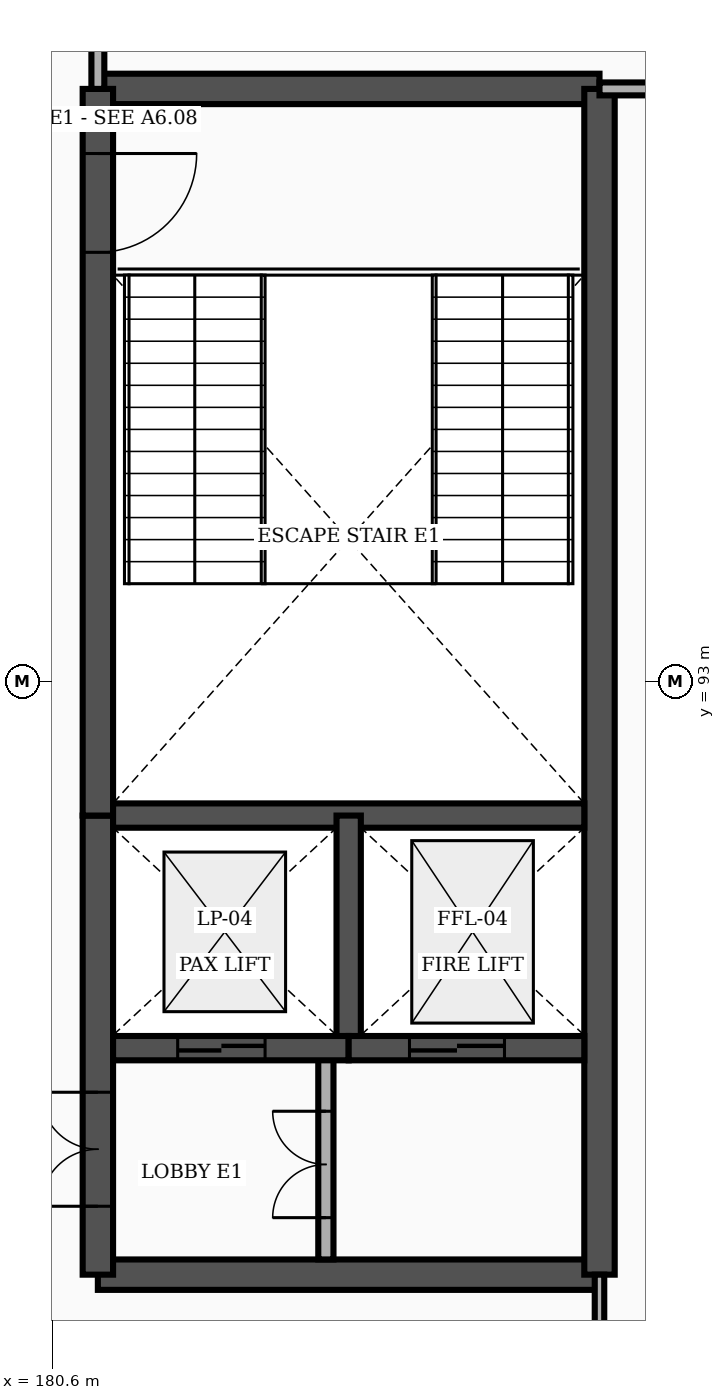
"""IFC4 building model, lengths in metres.
Left out: names, types, materials, properties, quantities, classifications, styles, units other than length and angle.
Written with IfcOpenShell. Run it as: python <this file> out.ifc"""

import sys

from ifc_helpers import new_model, si_unit, direction, frame, frame_2d, origin, place, context, subcontext, project, spatial, rectangle, extrude, element, fill, save


model = new_model("IFC4")
c1 = context("Model", 3, precision=1e-05, world=origin(), true_north=direction((0.0, 1.0)))
c2 = subcontext(c1, "Body", "Model", "MODEL_VIEW")
j1 = project(units=[si_unit("LENGTHUNIT", "METRE"), si_unit("PLANEANGLEUNIT", "RADIAN")], contexts=[c1])
p1 = place(None, origin())
s1 = spatial("IfcSite", under=j1, at=p1, CompositionType="ELEMENT")
p2 = place(p1, origin())
s2 = spatial("IfcBuilding", under=s1, at=p2, CompositionType="ELEMENT")
p3 = place(p2, frame((0.0, 0.0, 16.8)))
s3 = spatial("IfcBuildingStorey", under=s2, at=p3, CompositionType="ELEMENT", Elevation=16.8)
for number, where, z_axis, x_axis in (
    (1, (181.2, 85.2, 0.0), (0.0, 0.0, 1.0), (1.0, 0.0, 0.0)),
    (2, (181.2, 100.8, 0.0), (0.0, 0.0, 1.0), (1.0, 0.0, 0.0)),
):
    element("IfcWall", number, at=place(p3, frame(where, z_axis=z_axis, x_axis=x_axis)), inside=s3, PredefinedType="SHEAR", context=c2, shape_type="SweptSolid", body=[
        extrude(rectangle(XDim=6.6, YDim=0.4, at=frame_2d((3.3, 0.0))), origin(), (0.0, 0.0, 1.0), 4.555),
    ])
p4 = place(p3, frame((187.8, 85.2, 0.0), z_axis=(0.0, 0.0, 1.0), x_axis=(0.0, 1.0, 0.0)))
e3 = element("IfcWall", 3, at=p4, inside=s3, PredefinedType="SHEAR", context=c2, shape_type="SweptSolid", body=[
    extrude(rectangle(XDim=15.6, YDim=0.4, at=frame_2d((7.8, 0.0))), origin(), (0.0, 0.0, 1.0), 4.555),
])
p5 = place(p3, frame((181.2, 85.2, 0.0), z_axis=(0.0, 0.0, 1.0), x_axis=(0.0, 1.0, 0.0)))
e4 = element("IfcWall", 4, at=p5, inside=s3, PredefinedType="SHEAR", context=c2, shape_type="SweptSolid", body=[
    extrude(rectangle(XDim=6.04, YDim=0.4, at=frame_2d((3.02, 0.0))), origin(), (0.0, 0.0, 1.0), 4.555),
])
p6 = place(p5, frame((0.9, 0.0, 0.0)))
e5 = element("IfcOpeningElement", 5, at=p6, cuts=e4, PredefinedType="OPENING", context=c2, shape_type="SweptSolid", body=[
    extrude(rectangle(XDim=1.5, YDim=2.2, at=frame_2d((0.75, 1.1))), frame((0.0, 0.212, 0.0), z_axis=(0.0, -1.0, 0.0), x_axis=(1.0, 0.0, 0.0)), (0.0, 0.0, 1.0), 0.424),
])
p7 = place(p3, frame((181.2, 91.24, 0.0), z_axis=(0.0, 0.0, 1.0), x_axis=(0.0, 1.0, 0.0)))
e6 = element("IfcWall", 6, at=p7, inside=s3, PredefinedType="SHEAR", context=c2, shape_type="SweptSolid", body=[
    extrude(rectangle(XDim=9.56, YDim=0.4, at=frame_2d((4.78, 0.0))), origin(), (0.0, 0.0, 1.0), 4.555),
])
p8 = place(p7, frame((7.41, 0.0, 0.0)))
e7 = element("IfcOpeningElement", 7, at=p8, cuts=e6, PredefinedType="OPENING", context=c2, shape_type="SweptSolid", body=[
    extrude(rectangle(XDim=1.3, YDim=2.2, at=frame_2d((0.65, 1.1))), frame((0.0, 0.212, 0.0), z_axis=(0.0, -1.0, 0.0), x_axis=(1.0, 0.0, 0.0)), (0.0, 0.0, 1.0), 0.424),
])
p9 = place(p3, frame((181.4, 91.24, 0.0), z_axis=(0.0, 0.0, 1.0), x_axis=(1.0, 0.0, 0.0)))
e8 = element("IfcWall", 8, at=p9, inside=s3, PredefinedType="SHEAR", context=c2, shape_type="SweptSolid", body=[
    extrude(rectangle(XDim=6.2, YDim=0.32, at=frame_2d((3.1, 0.0))), origin(), (0.0, 0.0, 1.0), 4.555),
])
p10 = place(p3, frame((184.5, 88.18, 0.0), z_axis=(0.0, 0.0, 1.0), x_axis=(0.0, 1.0, 0.0)))
e9 = element("IfcWall", 9, at=p10, inside=s3, PredefinedType="SHEAR", context=c2, shape_type="SweptSolid", body=[
    extrude(rectangle(XDim=3.06, YDim=0.32, at=frame_2d((1.53, 0.0))), origin(), (0.0, 0.0, 1.0), 4.555),
])
p11 = place(p3, frame((184.2, 85.4, 0.0), z_axis=(0.0, 0.0, 1.0), x_axis=(0.0, 1.0, 0.0)))
e10 = element("IfcWall", 10, at=p11, inside=s3, PredefinedType="PARTITIONING", context=c2, shape_type="SweptSolid", body=[
    extrude(rectangle(XDim=2.78, YDim=0.2, at=frame_2d((1.39, 0.0))), origin(), (0.0, 0.0, 1.0), 4.555),
])
p12 = place(p11, frame((0.55, 0.0, 0.0)))
e11 = element("IfcOpeningElement", 11, at=p12, cuts=e10, PredefinedType="OPENING", context=c2, shape_type="SweptSolid", body=[
    extrude(rectangle(XDim=1.4, YDim=2.25, at=frame_2d((0.7, 1.125))), frame((0.0, 0.112, 0.0), z_axis=(0.0, -1.0, 0.0), x_axis=(1.0, 0.0, 0.0)), (0.0, 0.0, 1.0), 0.224),
])
p13 = place(p3, frame((181.4, 88.18, 0.0), z_axis=(0.0, 0.0, 1.0), x_axis=(1.0, 0.0, 0.0)))
e12 = element("IfcWall", 12, at=p13, inside=s3, PredefinedType="SHEAR", context=c2, shape_type="SweptSolid", body=[
    extrude(rectangle(XDim=3.1, YDim=0.32, at=frame_2d((1.55, 0.0))), origin(), (0.0, 0.0, 1.0), 4.555),
])
p14 = place(p13, frame((0.85, 0.0, 0.0)))
e13 = element("IfcOpeningElement", 13, at=p14, cuts=e12, PredefinedType="OPENING", context=c2, shape_type="SweptSolid", body=[
    extrude(rectangle(XDim=1.15, YDim=2.2, at=frame_2d((0.575, 1.1))), frame((0.0, 0.172, 0.0), z_axis=(0.0, -1.0, 0.0), x_axis=(1.0, 0.0, 0.0)), (0.0, 0.0, 1.0), 0.344),
])
p15 = place(p3, frame((184.5, 88.18, 0.0), z_axis=(0.0, 0.0, 1.0), x_axis=(1.0, 0.0, 0.0)))
e14 = element("IfcWall", 14, at=p15, inside=s3, PredefinedType="SHEAR", context=c2, shape_type="SweptSolid", body=[
    extrude(rectangle(XDim=3.1, YDim=0.32, at=frame_2d((1.55, 0.0))), origin(), (0.0, 0.0, 1.0), 4.555),
])
p16 = place(p15, frame((0.8, 0.0, 0.0)))
e15 = element("IfcOpeningElement", 15, at=p16, cuts=e14, PredefinedType="OPENING", context=c2, shape_type="SweptSolid", body=[
    extrude(rectangle(XDim=1.25, YDim=2.25, at=frame_2d((0.625, 1.125))), frame((0.0, 0.172, 0.0), z_axis=(0.0, -1.0, 0.0), x_axis=(1.0, 0.0, 0.0)), (0.0, 0.0, 1.0), 0.344),
])
p17 = place(p3, frame((187.8, 83.2, 0.0), z_axis=(0.0, 0.0, 1.0), x_axis=(0.0, 1.0, 0.0)))
e16 = element("IfcWall", 16, at=p17, inside=s3, PredefinedType="PARTITIONING", context=c2, shape_type="SweptSolid", body=[
    extrude(rectangle(XDim=2.0, YDim=0.125, at=frame_2d((1.0, 0.0))), origin(), (0.0, 0.0, 1.0), 4.555),
])
p18 = place(p3, frame((187.8, 100.8, 0.0), z_axis=(0.0, 0.0, 1.0), x_axis=(1.0, 0.0, 0.0)))
e17 = element("IfcWall", 17, at=p18, inside=s3, PredefinedType="PARTITIONING", context=c2, shape_type="SweptSolid", body=[
    extrude(rectangle(XDim=10.03, YDim=0.17, at=frame_2d((5.015, 0.0))), origin(), (0.0, 0.0, 1.0), 4.555),
])
p19 = place(p3, frame((181.2, 100.8, 0.0), z_axis=(0.0, 0.0, 1.0), x_axis=(0.0, 1.0, 0.0)))
e18 = element("IfcWall", 18, at=p19, inside=s3, PredefinedType="PARTITIONING", context=c2, shape_type="SweptSolid", body=[
    extrude(rectangle(XDim=19.03, YDim=0.17, at=frame_2d((9.515, 0.0))), origin(), (0.0, 0.0, 1.0), 4.555),
])
p20 = place(p19, frame((3.3, 0.0, 0.0)))
e19 = element("IfcOpeningElement", 19, at=p20, cuts=e18, PredefinedType="OPENING", context=c2, shape_type="SweptSolid", body=[
    extrude(rectangle(XDim=1.15, YDim=2.15, at=frame_2d((0.575, 1.075))), frame((0.0, 0.097, 0.0), z_axis=(0.0, -1.0, 0.0), x_axis=(1.0, 0.0, 0.0)), (0.0, 0.0, 1.0), 0.194),
])
p21 = place(p6, origin())
e20 = element("IfcDoor", 20, at=p21, inside=s3, OperationType="DOUBLE_DOOR_SINGLE_SWING", PredefinedType="DOOR", context=c2, shape_type="SweptSolid", body=[
    extrude(rectangle(XDim=1.5, YDim=2.2, at=frame_2d((0.75, 1.1))), frame((0.0, 0.025, 0.0), z_axis=(0.0, -1.0, 0.0), x_axis=(1.0, 0.0, 0.0)), (0.0, 0.0, 1.0), 0.05),
])
fill(e5, e20)
p22 = place(p8, frame((1.3, 0.0, 0.0), z_axis=(0.0, 0.0, 1.0), x_axis=(-1.0, 0.0, 0.0)))
e21 = element("IfcDoor", 21, at=p22, inside=s3, OperationType="SINGLE_SWING_LEFT", PredefinedType="DOOR", context=c2, shape_type="SweptSolid", body=[
    extrude(rectangle(XDim=1.3, YDim=2.2, at=frame_2d((0.65, 1.1))), frame((0.0, 0.025, 0.0), z_axis=(0.0, -1.0, 0.0), x_axis=(1.0, 0.0, 0.0)), (0.0, 0.0, 1.0), 0.05),
])
fill(e7, e21)
p23 = place(p12, origin())
e22 = element("IfcDoor", 22, at=p23, inside=s3, OperationType="DOUBLE_DOOR_SINGLE_SWING", PredefinedType="DOOR", context=c2, shape_type="SweptSolid", body=[
    extrude(rectangle(XDim=1.4, YDim=2.25, at=frame_2d((0.7, 1.125))), frame((0.0, 0.025, 0.0), z_axis=(0.0, -1.0, 0.0), x_axis=(1.0, 0.0, 0.0)), (0.0, 0.0, 1.0), 0.05),
])
fill(e11, e22)
p24 = place(p14, origin())
e23 = element("IfcDoor", 23, at=p24, inside=s3, OperationType="DOUBLE_DOOR_SLIDING", PredefinedType="DOOR", context=c2, shape_type="SweptSolid", body=[
    extrude(rectangle(XDim=1.15, YDim=2.2, at=frame_2d((0.575, 1.1))), frame((0.0, 0.025, 0.0), z_axis=(0.0, -1.0, 0.0), x_axis=(1.0, 0.0, 0.0)), (0.0, 0.0, 1.0), 0.05),
])
fill(e13, e23)
p25 = place(p16, origin())
e24 = element("IfcDoor", 24, at=p25, inside=s3, OperationType="DOUBLE_DOOR_SLIDING", PredefinedType="DOOR", context=c2, shape_type="SweptSolid", body=[
    extrude(rectangle(XDim=1.25, YDim=2.25, at=frame_2d((0.625, 1.125))), frame((0.0, 0.025, 0.0), z_axis=(0.0, -1.0, 0.0), x_axis=(1.0, 0.0, 0.0)), (0.0, 0.0, 1.0), 0.05),
])
fill(e15, e24)
save(model, sys.argv[1])
